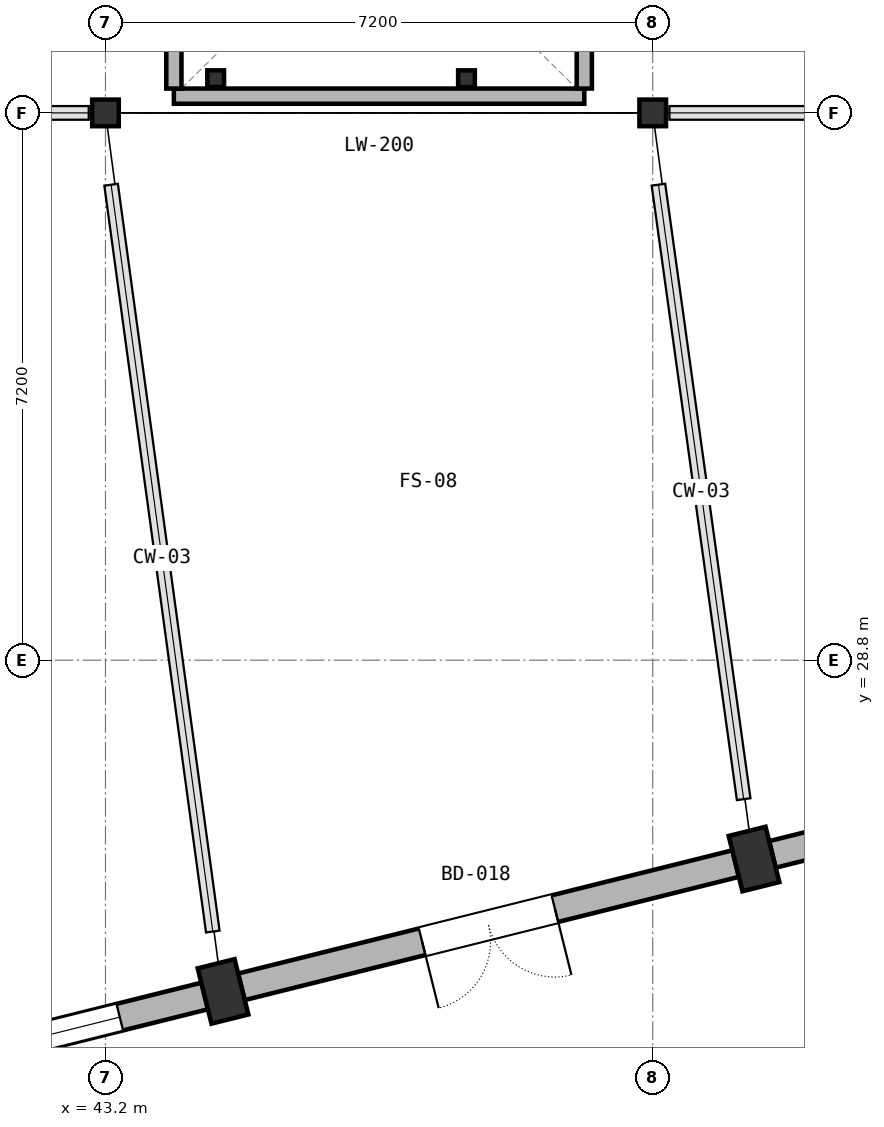
"""IFC4 building model, lengths in metres.
Left out: names, types, materials, properties, quantities, classifications, styles, units other than length and angle.
Written with IfcOpenShell. Run it as: python <this file> out.ifc"""

import sys

from ifc_helpers import new_model, si_unit, direction, frame, frame_2d, origin, origin_2d, place, context, subcontext, project, spatial, rectangle, hollow_rectangle, i_section, extrude, element, fill, save


model = new_model("IFC4")
c1 = context("Model", 3, precision=1e-05, world=origin(), true_north=direction((0.0, 1.0)))
c2 = subcontext(c1, "Body", "Model", "MODEL_VIEW")
j1 = project(units=[si_unit("LENGTHUNIT", "METRE"), si_unit("PLANEANGLEUNIT", "RADIAN")], contexts=[c1])
p1 = place(None, origin())
s1 = spatial("IfcSite", under=j1, at=p1, CompositionType="ELEMENT")
p2 = place(p1, origin())
s2 = spatial("IfcBuilding", under=s1, at=p2, CompositionType="ELEMENT")
p3 = place(p2, frame((0.0, 0.0, 10.2)))
s3 = spatial("IfcBuildingStorey", under=s2, at=p3, CompositionType="ELEMENT", Elevation=10.2)
for number, where, z_axis, x_axis in (
    (1, (44.747, 24.442, 0.0), (0.0, 0.0, 1.0), (0.97, 0.242, 0.0)),
    (2, (51.733, 26.184, 0.0), (0.0, 0.0, 1.0), (0.97, 0.242, 0.0)),
):
    element("IfcColumn", number, at=place(p3, frame(where, z_axis=z_axis, x_axis=x_axis)), inside=s3, PredefinedType="COLUMN", context=c2, shape_type="SweptSolid", body=[
        extrude(rectangle(XDim=0.5, YDim=0.75, at=origin_2d()), origin(), (0.0, 0.0, 1.0), 4.2),
    ])
for number, where, z_axis, x_axis in (
    (3, (43.2, 36.0, 0.0), (0.0, 0.0, 1.0), (1.0, 0.0, 0.0)),
    (4, (50.4, 36.0, 0.0), (0.0, 0.0, 1.0), (1.0, 0.0, 0.0)),
):
    element("IfcColumn", number, at=place(p3, frame(where, z_axis=z_axis, x_axis=x_axis)), inside=s3, PredefinedType="COLUMN", context=c2, shape_type="SweptSolid", body=[
        extrude(i_section(OverallWidth=0.35, OverallDepth=0.35, WebThickness=0.012, FlangeThickness=0.019, FilletRadius=0.02, at=origin_2d()), origin(), (0.0, 0.0, 1.0), 4.2),
    ])
for number, where, z_axis, x_axis in (
    (5, (44.65, 36.45, 0.0), (0.0, 0.0, 1.0), (1.0, 0.0, 0.0)),
    (6, (47.95, 36.45, 0.0), (0.0, 0.0, 1.0), (1.0, 0.0, 0.0)),
):
    element("IfcColumn", number, at=place(p3, frame(where, z_axis=z_axis, x_axis=x_axis)), inside=s3, PredefinedType="COLUMN", context=c2, shape_type="SweptSolid", body=[
        extrude(hollow_rectangle(XDim=0.22, YDim=0.22, WallThickness=0.01, InnerFilletRadius=0.01, OuterFilletRadius=0.02, at=origin_2d()), origin(), (0.0, 0.0, 1.0), 1.92),
    ])
p4 = place(p3, frame((49.5, 36.22, 0.0), z_axis=(0.0, 0.0, 1.0), x_axis=(-1.0, 0.0, 0.0)))
e7 = element("IfcWall", 7, at=p4, inside=s3, PredefinedType="PARTITIONING", context=c2, shape_type="SweptSolid", body=[
    extrude(rectangle(XDim=5.4, YDim=0.2, at=frame_2d((2.7, 0.0))), origin(), (0.0, 0.0, 1.0), 3.42),
])
for number, where, z_axis, x_axis in (
    (8, (44.1, 42.88, 0.0), (0.0, 0.0, 1.0), (0.0, -1.0, 0.0)),
    (9, (49.5, 36.32, 0.0), (0.0, 0.0, 1.0), (0.0, 1.0, 0.0)),
):
    element("IfcWall", number, at=place(p3, frame(where, z_axis=z_axis, x_axis=x_axis)), inside=s3, PredefinedType="PARTITIONING", context=c2, shape_type="SweptSolid", body=[
        extrude(rectangle(XDim=6.56, YDim=0.2, at=frame_2d((3.28, 0.0))), origin(), (0.0, 0.0, 1.0), 3.42),
    ])
p5 = place(p3, frame((44.506, 24.382, 0.0), z_axis=(0.0, 0.0, 1.0), x_axis=(-0.970296540998, -0.241918627903, 0.0)))
e10 = element("IfcWall", 10, at=p5, inside=s3, PredefinedType="SOLIDWALL", context=c2, shape_type="SweptSolid", body=[
    extrude(rectangle(XDim=6.704, YDim=0.36, at=frame_2d((3.352, 0.0))), origin(), (0.0, 0.0, 1.0), 3.04),
])
p6 = place(p5, frame((1.152, 0.0, 0.65)))
e11 = element("IfcOpeningElement", 11, at=p6, cuts=e10, PredefinedType="OPENING", context=c2, shape_type="SweptSolid", body=[
    extrude(rectangle(XDim=1.35, YDim=2.15, at=frame_2d((0.675, 1.075))), frame((0.0, 0.19, 0.0), z_axis=(0.0, -1.0, 0.0), x_axis=(1.0, 0.0, 0.0)), (0.0, 0.0, 1.0), 0.38),
])
p7 = place(p5, frame((4.252, 0.0, 0.65)))
e12 = element("IfcOpeningElement", 12, at=p7, cuts=e10, PredefinedType="OPENING", context=c2, shape_type="SweptSolid", body=[
    extrude(rectangle(XDim=1.35, YDim=2.15, at=frame_2d((0.675, 1.075))), frame((0.0, 0.19, 0.0), z_axis=(0.0, -1.0, 0.0), x_axis=(1.0, 0.0, 0.0)), (0.0, 0.0, 1.0), 0.38),
])
p8 = place(p3, frame((51.492, 26.124, 0.0), z_axis=(0.0, 0.0, 1.0), x_axis=(-0.970287992186, -0.241952913229, 0.0)))
e13 = element("IfcWall", 13, at=p8, inside=s3, PredefinedType="SOLIDWALL", context=c2, shape_type="SweptSolid", body=[
    extrude(rectangle(XDim=6.704, YDim=0.36, at=frame_2d((3.352, 0.0))), origin(), (0.0, 0.0, 1.0), 2.58),
])
p9 = place(p8, frame((2.452, 0.0, 0.0)))
e14 = element("IfcOpeningElement", 14, at=p9, cuts=e13, PredefinedType="OPENING", context=c2, shape_type="SweptSolid", body=[
    extrude(rectangle(XDim=1.8, YDim=2.2, at=frame_2d((0.9, 1.1))), frame((0.0, 0.19, 0.0), z_axis=(0.0, -1.0, 0.0), x_axis=(1.0, 0.0, 0.0)), (0.0, 0.0, 1.0), 0.38),
])
p10 = place(p3, frame((58.478, 27.866, 0.0), z_axis=(0.0, 0.0, 1.0), x_axis=(-0.970296540998, -0.241918627903, 0.0)))
e15 = element("IfcWall", 15, at=p10, inside=s3, PredefinedType="SOLIDWALL", context=c2, shape_type="SweptSolid", body=[
    extrude(rectangle(XDim=6.704, YDim=0.36, at=frame_2d((3.352, 0.0))), origin(), (0.0, 0.0, 1.0), 3.04),
])
p11 = place(p10, frame((1.152, 0.0, 0.65)))
e16 = element("IfcOpeningElement", 16, at=p11, cuts=e15, PredefinedType="OPENING", context=c2, shape_type="SweptSolid", body=[
    extrude(rectangle(XDim=1.35, YDim=2.15, at=frame_2d((0.675, 1.075))), frame((0.0, 0.19, 0.0), z_axis=(0.0, -1.0, 0.0), x_axis=(1.0, 0.0, 0.0)), (0.0, 0.0, 1.0), 0.38),
])
p12 = place(p10, frame((4.252, 0.0, 0.65)))
e17 = element("IfcOpeningElement", 17, at=p12, cuts=e15, PredefinedType="OPENING", context=c2, shape_type="SweptSolid", body=[
    extrude(rectangle(XDim=1.35, YDim=2.15, at=frame_2d((0.675, 1.075))), frame((0.0, 0.19, 0.0), z_axis=(0.0, -1.0, 0.0), x_axis=(1.0, 0.0, 0.0)), (0.0, 0.0, 1.0), 0.38),
])
p13 = place(p6, origin())
e18 = element("IfcWindow", 18, at=p13, inside=s3, PartitioningType="DOUBLE_PANEL_VERTICAL", PredefinedType="WINDOW", context=c2, shape_type="SweptSolid", body=[
    extrude(rectangle(XDim=1.35, YDim=2.15, at=frame_2d((0.675, 1.075))), frame((0.0, 0.03, 0.0), z_axis=(0.0, -1.0, 0.0), x_axis=(1.0, 0.0, 0.0)), (0.0, 0.0, 1.0), 0.06),
])
fill(e11, e18)
p14 = place(p9, origin())
e19 = element("IfcDoor", 19, at=p14, inside=s3, OperationType="DOUBLE_DOOR_SINGLE_SWING", PredefinedType="DOOR", context=c2, shape_type="SweptSolid", body=[
    extrude(rectangle(XDim=1.8, YDim=2.2, at=frame_2d((0.9, 1.1))), frame((0.0, 0.025, 0.0), z_axis=(0.0, -1.0, 0.0), x_axis=(1.0, 0.0, 0.0)), (0.0, 0.0, 1.0), 0.05),
])
fill(e14, e19)
save(model, sys.argv[1])
